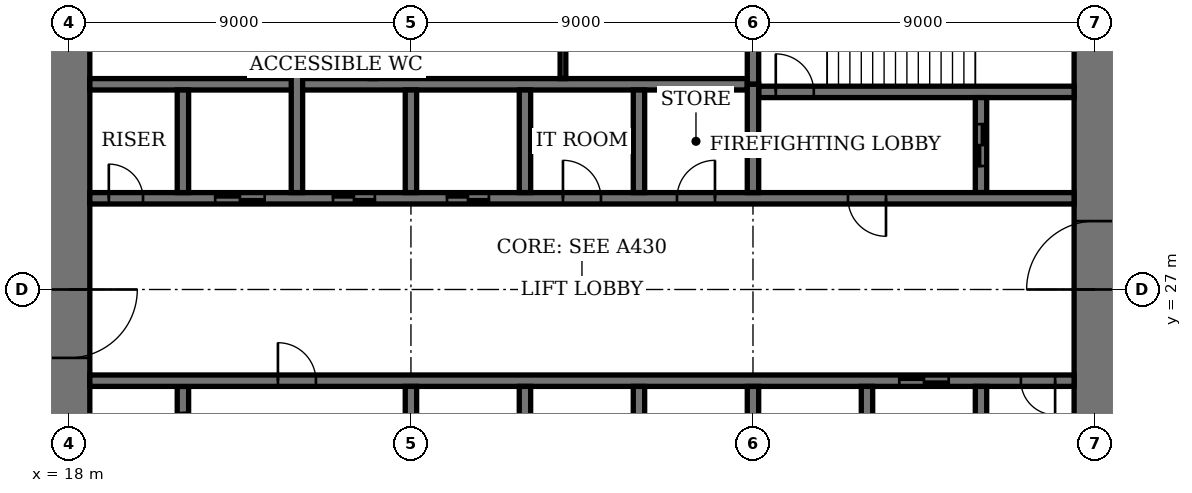
"""IFC4 building model, lengths in metres.
Left out: names, types, materials, properties, quantities, classifications, styles, units other than length and angle.
Written with IfcOpenShell. Run it as: python <this file> out.ifc"""

import sys

from ifc_helpers import new_model, si_unit, direction, frame, frame_2d, origin, place, context, subcontext, project, spatial, rectangle, extrude, element, fill, save


model = new_model("IFC4")
c1 = context("Model", 3, precision=1e-05, world=origin(), true_north=direction((0.0, 1.0)))
c2 = subcontext(c1, "Body", "Model", "MODEL_VIEW")
j1 = project(units=[si_unit("LENGTHUNIT", "METRE"), si_unit("PLANEANGLEUNIT", "RADIAN")], contexts=[c1])
p1 = place(None, origin())
s1 = spatial("IfcSite", under=j1, at=p1, CompositionType="ELEMENT")
p2 = place(p1, origin())
s2 = spatial("IfcBuilding", under=s1, at=p2, CompositionType="ELEMENT")
p3 = place(p2, frame((0.0, 0.0, 226.2)))
s3 = spatial("IfcBuildingStorey", under=s2, at=p3, CompositionType="ELEMENT", Elevation=226.2)
p4 = place(p3, frame((18.0, 35.45, 0.0), z_axis=(0.0, 0.0, 1.0), x_axis=(0.0, -1.0, 0.0)))
e1 = element("IfcWall", 1, at=p4, inside=s3, PredefinedType="SHEAR", context=c2, shape_type="SweptSolid", body=[
    extrude(rectangle(XDim=16.9, YDim=1.1, at=frame_2d((8.45, 0.0))), origin(), (0.0, 0.0, 1.0), 4.0),
])
p5 = place(p4, frame((8.45, 0.0, 0.0)))
e2 = element("IfcOpeningElement", 2, at=p5, cuts=e1, PredefinedType="OPENING", context=c2, shape_type="SweptSolid", body=[
    extrude(rectangle(XDim=1.8, YDim=2.4, at=frame_2d((0.9, 1.2))), frame((0.0, 0.56, 0.0), z_axis=(0.0, -1.0, 0.0), x_axis=(1.0, 0.0, 0.0)), (0.0, 0.0, 1.0), 1.12),
])
p6 = place(p3, frame((45.0, 18.55, 0.0), z_axis=(0.0, 0.0, 1.0), x_axis=(0.0, 1.0, 0.0)))
e3 = element("IfcWall", 3, at=p6, inside=s3, PredefinedType="SHEAR", context=c2, shape_type="SweptSolid", body=[
    extrude(rectangle(XDim=16.9, YDim=1.1, at=frame_2d((8.45, 0.0))), origin(), (0.0, 0.0, 1.0), 4.0),
])
p7 = place(p6, frame((8.45, 0.0, 0.0)))
e4 = element("IfcOpeningElement", 4, at=p7, cuts=e3, PredefinedType="OPENING", context=c2, shape_type="SweptSolid", body=[
    extrude(rectangle(XDim=1.8, YDim=2.4, at=frame_2d((0.9, 1.2))), frame((0.0, 0.56, 0.0), z_axis=(0.0, -1.0, 0.0), x_axis=(1.0, 0.0, 0.0)), (0.0, 0.0, 1.0), 1.12),
])
p8 = place(p3, frame((36.15, 32.2, 0.0), z_axis=(0.0, 0.0, 1.0), x_axis=(1.0, 0.0, 0.0)))
e5 = element("IfcWall", 5, at=p8, inside=s3, PredefinedType="SHEAR", context=c2, shape_type="SweptSolid", body=[
    extrude(rectangle(XDim=8.3, YDim=0.3, at=frame_2d((4.15, 0.0))), origin(), (0.0, 0.0, 1.0), 4.0),
])
p9 = place(p8, frame((0.45, 0.0, 0.0)))
e6 = element("IfcOpeningElement", 6, at=p9, cuts=e5, PredefinedType="OPENING", context=c2, shape_type="SweptSolid", body=[
    extrude(rectangle(XDim=1.0, YDim=2.4, at=frame_2d((0.5, 1.2))), frame((0.0, 0.16, 0.0), z_axis=(0.0, -1.0, 0.0), x_axis=(1.0, 0.0, 0.0)), (0.0, 0.0, 1.0), 0.32),
])
p10 = place(p3, frame((36.0, 32.4, 0.0), z_axis=(0.0, 0.0, 1.0), x_axis=(0.0, 1.0, 0.0)))
e7 = element("IfcWall", 7, at=p10, inside=s3, PredefinedType="SHEAR", context=c2, shape_type="SweptSolid", body=[
    extrude(rectangle(XDim=3.05, YDim=0.3, at=frame_2d((1.525, 0.0))), origin(), (0.0, 0.0, 1.0), 4.0),
])
p11 = place(p3, frame((21.0, 21.95, 0.0), z_axis=(0.0, 0.0, 1.0), x_axis=(0.0, 1.0, 0.0)))
e8 = element("IfcWall", 8, at=p11, inside=s3, PredefinedType="SHEAR", context=c2, shape_type="SweptSolid", body=[
    extrude(rectangle(XDim=2.5, YDim=0.3, at=frame_2d((1.25, 0.0))), origin(), (0.0, 0.0, 1.0), 4.0),
])
p12 = place(p11, frame((0.7, 0.0, 0.0)))
e9 = element("IfcOpeningElement", 9, at=p12, cuts=e8, PredefinedType="OPENING", context=c2, shape_type="SweptSolid", body=[
    extrude(rectangle(XDim=1.1, YDim=2.4, at=frame_2d((0.55, 1.2))), frame((0.0, 0.16, 0.0), z_axis=(0.0, -1.0, 0.0), x_axis=(1.0, 0.0, 0.0)), (0.0, 0.0, 1.0), 0.32),
])
p13 = place(p3, frame((42.0, 29.55, 0.0), z_axis=(0.0, 0.0, 1.0), x_axis=(0.0, 1.0, 0.0)))
e10 = element("IfcWall", 10, at=p13, inside=s3, PredefinedType="SHEAR", context=c2, shape_type="SweptSolid", body=[
    extrude(rectangle(XDim=2.5, YDim=0.3, at=frame_2d((1.25, 0.0))), origin(), (0.0, 0.0, 1.0), 4.0),
])
p14 = place(p13, frame((0.7, 0.0, 0.0)))
e11 = element("IfcOpeningElement", 11, at=p14, cuts=e10, PredefinedType="OPENING", context=c2, shape_type="SweptSolid", body=[
    extrude(rectangle(XDim=1.1, YDim=2.4, at=frame_2d((0.55, 1.2))), frame((0.0, 0.16, 0.0), z_axis=(0.0, -1.0, 0.0), x_axis=(1.0, 0.0, 0.0)), (0.0, 0.0, 1.0), 0.32),
])
p15 = place(p3, frame((18.55, 24.6, 0.0), z_axis=(0.0, 0.0, 1.0), x_axis=(1.0, 0.0, 0.0)))
e12 = element("IfcWall", 12, at=p15, inside=s3, PredefinedType="SHEAR", context=c2, shape_type="SweptSolid", body=[
    extrude(rectangle(XDim=25.9, YDim=0.3, at=frame_2d((12.95, 0.0))), origin(), (0.0, 0.0, 1.0), 4.0),
])
p16 = place(p15, frame((4.95, 0.0, 0.0)))
e13 = element("IfcOpeningElement", 13, at=p16, cuts=e12, PredefinedType="OPENING", context=c2, shape_type="SweptSolid", body=[
    extrude(rectangle(XDim=1.0, YDim=2.4, at=frame_2d((0.5, 1.2))), frame((0.0, 0.16, 0.0), z_axis=(0.0, -1.0, 0.0), x_axis=(1.0, 0.0, 0.0)), (0.0, 0.0, 1.0), 0.32),
])
p17 = place(p15, frame((24.5, 0.0, 0.0)))
e14 = element("IfcOpeningElement", 14, at=p17, cuts=e12, PredefinedType="OPENING", context=c2, shape_type="SweptSolid", body=[
    extrude(rectangle(XDim=0.9, YDim=2.1, at=frame_2d((0.45, 1.05))), frame((0.0, 0.16, 0.0), z_axis=(0.0, -1.0, 0.0), x_axis=(1.0, 0.0, 0.0)), (0.0, 0.0, 1.0), 0.32),
])
p18 = place(p15, frame((21.3, 0.0, 0.0)))
e15 = element("IfcOpeningElement", 15, at=p18, cuts=e12, PredefinedType="OPENING", context=c2, shape_type="SweptSolid", body=[
    extrude(rectangle(XDim=1.3, YDim=2.4, at=frame_2d((0.65, 1.2))), frame((0.0, 0.16, 0.0), z_axis=(0.0, -1.0, 0.0), x_axis=(1.0, 0.0, 0.0)), (0.0, 0.0, 1.0), 0.32),
])
p19 = place(p3, frame((18.55, 29.4, 0.0), z_axis=(0.0, 0.0, 1.0), x_axis=(1.0, 0.0, 0.0)))
e16 = element("IfcWall", 16, at=p19, inside=s3, PredefinedType="SHEAR", context=c2, shape_type="SweptSolid", body=[
    extrude(rectangle(XDim=25.9, YDim=0.3, at=frame_2d((12.95, 0.0))), origin(), (0.0, 0.0, 1.0), 4.0),
])
p20 = place(p19, frame((19.95, 0.0, 0.0)))
e17 = element("IfcOpeningElement", 17, at=p20, cuts=e16, PredefinedType="OPENING", context=c2, shape_type="SweptSolid", body=[
    extrude(rectangle(XDim=1.0, YDim=2.4, at=frame_2d((0.5, 1.2))), frame((0.0, 0.16, 0.0), z_axis=(0.0, -1.0, 0.0), x_axis=(1.0, 0.0, 0.0)), (0.0, 0.0, 1.0), 0.32),
])
p21 = place(p19, frame((0.5, 0.0, 0.0)))
e18 = element("IfcOpeningElement", 18, at=p21, cuts=e16, PredefinedType="OPENING", context=c2, shape_type="SweptSolid", body=[
    extrude(rectangle(XDim=0.9, YDim=2.1, at=frame_2d((0.45, 1.05))), frame((0.0, 0.16, 0.0), z_axis=(0.0, -1.0, 0.0), x_axis=(1.0, 0.0, 0.0)), (0.0, 0.0, 1.0), 0.32),
])
p22 = place(p19, frame((15.45, 0.0, 0.0)))
e19 = element("IfcOpeningElement", 19, at=p22, cuts=e16, PredefinedType="OPENING", context=c2, shape_type="SweptSolid", body=[
    extrude(rectangle(XDim=1.0, YDim=2.4, at=frame_2d((0.5, 1.2))), frame((0.0, 0.16, 0.0), z_axis=(0.0, -1.0, 0.0), x_axis=(1.0, 0.0, 0.0)), (0.0, 0.0, 1.0), 0.32),
])
p23 = place(p19, frame((12.45, 0.0, 0.0)))
e20 = element("IfcOpeningElement", 20, at=p23, cuts=e16, PredefinedType="OPENING", context=c2, shape_type="SweptSolid", body=[
    extrude(rectangle(XDim=1.0, YDim=2.4, at=frame_2d((0.5, 1.2))), frame((0.0, 0.16, 0.0), z_axis=(0.0, -1.0, 0.0), x_axis=(1.0, 0.0, 0.0)), (0.0, 0.0, 1.0), 0.32),
])
p24 = place(p19, frame((9.4, 0.0, 0.0)))
e21 = element("IfcOpeningElement", 21, at=p24, cuts=e16, PredefinedType="OPENING", context=c2, shape_type="SweptSolid", body=[
    extrude(rectangle(XDim=1.1, YDim=2.4, at=frame_2d((0.55, 1.2))), frame((0.0, 0.16, 0.0), z_axis=(0.0, -1.0, 0.0), x_axis=(1.0, 0.0, 0.0)), (0.0, 0.0, 1.0), 0.32),
])
p25 = place(p19, frame((6.4, 0.0, 0.0)))
e22 = element("IfcOpeningElement", 22, at=p25, cuts=e16, PredefinedType="OPENING", context=c2, shape_type="SweptSolid", body=[
    extrude(rectangle(XDim=1.1, YDim=2.4, at=frame_2d((0.55, 1.2))), frame((0.0, 0.16, 0.0), z_axis=(0.0, -1.0, 0.0), x_axis=(1.0, 0.0, 0.0)), (0.0, 0.0, 1.0), 0.32),
])
p26 = place(p19, frame((3.3, 0.0, 0.0)))
e23 = element("IfcOpeningElement", 23, at=p26, cuts=e16, PredefinedType="OPENING", context=c2, shape_type="SweptSolid", body=[
    extrude(rectangle(XDim=1.3, YDim=2.4, at=frame_2d((0.65, 1.2))), frame((0.0, 0.16, 0.0), z_axis=(0.0, -1.0, 0.0), x_axis=(1.0, 0.0, 0.0)), (0.0, 0.0, 1.0), 0.32),
])
p27 = place(p3, frame((18.55, 32.4, 0.0), z_axis=(0.0, 0.0, 1.0), x_axis=(1.0, 0.0, 0.0)))
e24 = element("IfcWall", 24, at=p27, inside=s3, PredefinedType="SHEAR", context=c2, shape_type="SweptSolid", body=[
    extrude(rectangle(XDim=17.3, YDim=0.3, at=frame_2d((8.65, 0.0))), origin(), (0.0, 0.0, 1.0), 4.0),
])
for number, where, z_axis, x_axis in (
    (25, (30.0, 21.75, 0.0), (0.0, 0.0, 1.0), (0.0, 1.0, 0.0)),
    (26, (33.0, 29.55, 0.0), (0.0, 0.0, 1.0), (0.0, 1.0, 0.0)),
    (27, (33.0, 21.75, 0.0), (0.0, 0.0, 1.0), (0.0, 1.0, 0.0)),
    (28, (30.0, 29.55, 0.0), (0.0, 0.0, 1.0), (0.0, 1.0, 0.0)),
    (29, (36.0, 21.75, 0.0), (0.0, 0.0, 1.0), (0.0, 1.0, 0.0)),
    (30, (27.0, 29.55, 0.0), (0.0, 0.0, 1.0), (0.0, 1.0, 0.0)),
):
    element("IfcWall", number, at=place(p3, frame(where, z_axis=z_axis, x_axis=x_axis)), inside=s3, PredefinedType="SHEAR", context=c2, shape_type="SweptSolid", body=[
        extrude(rectangle(XDim=2.7, YDim=0.3, at=frame_2d((1.35, 0.0))), origin(), (0.0, 0.0, 1.0), 4.0),
    ])
for number, where, z_axis, x_axis in (
    (31, (39.0, 18.55, 0.0), (0.0, 0.0, 1.0), (0.0, 1.0, 0.0)),
    (32, (24.0, 29.55, 0.0), (0.0, 0.0, 1.0), (0.0, 1.0, 0.0)),
):
    element("IfcWall", number, at=place(p3, frame(where, z_axis=z_axis, x_axis=x_axis)), inside=s3, PredefinedType="SHEAR", context=c2, shape_type="SweptSolid", body=[
        extrude(rectangle(XDim=5.9, YDim=0.3, at=frame_2d((2.95, 0.0))), origin(), (0.0, 0.0, 1.0), 4.0),
    ])
for number, where, z_axis, x_axis in (
    (33, (42.0, 21.75, 0.0), (0.0, 0.0, 1.0), (0.0, 1.0, 0.0)),
    (34, (21.0, 29.55, 0.0), (0.0, 0.0, 1.0), (0.0, 1.0, 0.0)),
):
    element("IfcWall", number, at=place(p3, frame(where, z_axis=z_axis, x_axis=x_axis)), inside=s3, PredefinedType="SHEAR", context=c2, shape_type="SweptSolid", body=[
        extrude(rectangle(XDim=2.7, YDim=0.3, at=frame_2d((1.35, 0.0))), origin(), (0.0, 0.0, 1.0), 4.0),
    ])
for number, where, z_axis, x_axis in (
    (35, (27.0, 21.6, 0.0), (0.0, 0.0, 1.0), (0.0, 1.0, 0.0)),
    (36, (36.0, 29.55, 0.0), (0.0, 0.0, 1.0), (0.0, 1.0, 0.0)),
):
    element("IfcWall", number, at=place(p3, frame(where, z_axis=z_axis, x_axis=x_axis)), inside=s3, PredefinedType="SHEAR", context=c2, shape_type="SweptSolid", body=[
        extrude(rectangle(XDim=2.85, YDim=0.3, at=frame_2d((1.425, 0.0))), origin(), (0.0, 0.0, 1.0), 4.0),
    ])
for number, where, z_axis, x_axis in (
    (37, (31.0, 32.55, 0.0), (0.0, 0.0, 1.0), (0.0, 1.0, 0.0)),
    (38, (26.0, 32.55, 0.0), (0.0, 0.0, 1.0), (0.0, 1.0, 0.0)),
):
    element("IfcWall", number, at=place(p3, frame(where, z_axis=z_axis, x_axis=x_axis)), inside=s3, PredefinedType="PARTITIONING", context=c2, shape_type="SweptSolid", body=[
        extrude(rectangle(XDim=2.9, YDim=0.15, at=frame_2d((1.45, 0.0))), origin(), (0.0, 0.0, 1.0), 3.75),
    ])
p28 = place(p5, origin())
e39 = element("IfcDoor", 39, at=p28, inside=s3, OperationType="DOUBLE_DOOR_DOUBLE_SWING", PredefinedType="DOOR", context=c2, shape_type="SweptSolid", body=[
    extrude(rectangle(XDim=1.8, YDim=2.4, at=frame_2d((0.9, 1.2))), frame((0.0, 0.03, 0.0), z_axis=(0.0, -1.0, 0.0), x_axis=(1.0, 0.0, 0.0)), (0.0, 0.0, 1.0), 0.06),
    extrude(rectangle(XDim=0.04, YDim=2.4, at=frame_2d((0.02, 1.2))), frame((0.0, 0.55, 0.0), z_axis=(0.0, -1.0, 0.0), x_axis=(1.0, 0.0, 0.0)), (0.0, 0.0, 1.0), 1.1),
    extrude(rectangle(XDim=0.04, YDim=2.4, at=frame_2d((1.78, 1.2))), frame((0.0, 0.55, 0.0), z_axis=(0.0, -1.0, 0.0), x_axis=(1.0, 0.0, 0.0)), (0.0, 0.0, 1.0), 1.1),
    extrude(rectangle(XDim=1.8, YDim=0.04, at=frame_2d((0.9, 2.38))), frame((0.0, 0.55, 0.0), z_axis=(0.0, -1.0, 0.0), x_axis=(1.0, 0.0, 0.0)), (0.0, 0.0, 1.0), 1.1),
])
fill(e2, e39)
p29 = place(p7, origin())
e40 = element("IfcDoor", 40, at=p29, inside=s3, OperationType="DOUBLE_DOOR_DOUBLE_SWING", PredefinedType="DOOR", context=c2, shape_type="SweptSolid", body=[
    extrude(rectangle(XDim=1.8, YDim=2.4, at=frame_2d((0.9, 1.2))), frame((0.0, 0.03, 0.0), z_axis=(0.0, -1.0, 0.0), x_axis=(1.0, 0.0, 0.0)), (0.0, 0.0, 1.0), 0.06),
    extrude(rectangle(XDim=0.04, YDim=2.4, at=frame_2d((0.02, 1.2))), frame((0.0, 0.55, 0.0), z_axis=(0.0, -1.0, 0.0), x_axis=(1.0, 0.0, 0.0)), (0.0, 0.0, 1.0), 1.1),
    extrude(rectangle(XDim=0.04, YDim=2.4, at=frame_2d((1.78, 1.2))), frame((0.0, 0.55, 0.0), z_axis=(0.0, -1.0, 0.0), x_axis=(1.0, 0.0, 0.0)), (0.0, 0.0, 1.0), 1.1),
    extrude(rectangle(XDim=1.8, YDim=0.04, at=frame_2d((0.9, 2.38))), frame((0.0, 0.55, 0.0), z_axis=(0.0, -1.0, 0.0), x_axis=(1.0, 0.0, 0.0)), (0.0, 0.0, 1.0), 1.1),
])
fill(e4, e40)
p30 = place(p9, origin())
e41 = element("IfcDoor", 41, at=p30, inside=s3, OperationType="SINGLE_SWING_RIGHT", PredefinedType="DOOR", context=c2, shape_type="SweptSolid", body=[
    extrude(rectangle(XDim=1.0, YDim=2.4, at=frame_2d((0.5, 1.2))), frame((0.0, 0.03, 0.0), z_axis=(0.0, -1.0, 0.0), x_axis=(1.0, 0.0, 0.0)), (0.0, 0.0, 1.0), 0.06),
])
fill(e6, e41)
p31 = place(p16, origin())
e42 = element("IfcDoor", 42, at=p31, inside=s3, OperationType="SINGLE_SWING_RIGHT", PredefinedType="DOOR", context=c2, shape_type="SweptSolid", body=[
    extrude(rectangle(XDim=1.0, YDim=2.4, at=frame_2d((0.5, 1.2))), frame((0.0, 0.03, 0.0), z_axis=(0.0, -1.0, 0.0), x_axis=(1.0, 0.0, 0.0)), (0.0, 0.0, 1.0), 0.06),
])
fill(e13, e42)
p32 = place(p20, origin())
e43 = element("IfcDoor", 43, at=p32, inside=s3, OperationType="SINGLE_SWING_RIGHT", PredefinedType="DOOR", context=c2, shape_type="SweptSolid", body=[
    extrude(rectangle(XDim=1.0, YDim=2.4, at=frame_2d((0.5, 1.2))), frame((0.0, 0.03, 0.0), z_axis=(0.0, -1.0, 0.0), x_axis=(1.0, 0.0, 0.0)), (0.0, 0.0, 1.0), 0.06),
])
fill(e17, e43)
p33 = place(p17, origin())
e44 = element("IfcDoor", 44, at=p33, inside=s3, OperationType="SINGLE_SWING_RIGHT", PredefinedType="DOOR", context=c2, shape_type="SweptSolid", body=[
    extrude(rectangle(XDim=0.9, YDim=2.1, at=frame_2d((0.45, 1.05))), frame((0.0, 0.03, 0.0), z_axis=(0.0, -1.0, 0.0), x_axis=(1.0, 0.0, 0.0)), (0.0, 0.0, 1.0), 0.06),
])
fill(e14, e44)
p34 = place(p21, origin())
e45 = element("IfcDoor", 45, at=p34, inside=s3, OperationType="SINGLE_SWING_RIGHT", PredefinedType="DOOR", context=c2, shape_type="SweptSolid", body=[
    extrude(rectangle(XDim=0.9, YDim=2.1, at=frame_2d((0.45, 1.05))), frame((0.0, 0.03, 0.0), z_axis=(0.0, -1.0, 0.0), x_axis=(1.0, 0.0, 0.0)), (0.0, 0.0, 1.0), 0.06),
])
fill(e18, e45)
p35 = place(p22, origin())
e46 = element("IfcDoor", 46, at=p35, inside=s3, OperationType="SINGLE_SWING_LEFT", PredefinedType="DOOR", context=c2, shape_type="SweptSolid", body=[
    extrude(rectangle(XDim=1.0, YDim=2.4, at=frame_2d((0.5, 1.2))), frame((0.0, 0.03, 0.0), z_axis=(0.0, -1.0, 0.0), x_axis=(1.0, 0.0, 0.0)), (0.0, 0.0, 1.0), 0.06),
])
fill(e19, e46)
p36 = place(p23, origin())
e47 = element("IfcDoor", 47, at=p36, inside=s3, OperationType="SINGLE_SWING_RIGHT", PredefinedType="DOOR", context=c2, shape_type="SweptSolid", body=[
    extrude(rectangle(XDim=1.0, YDim=2.4, at=frame_2d((0.5, 1.2))), frame((0.0, 0.03, 0.0), z_axis=(0.0, -1.0, 0.0), x_axis=(1.0, 0.0, 0.0)), (0.0, 0.0, 1.0), 0.06),
])
fill(e20, e47)
p37 = place(p24, origin())
e48 = element("IfcDoor", 48, at=p37, inside=s3, OperationType="DOUBLE_DOOR_SLIDING", PredefinedType="DOOR", context=c2, shape_type="SweptSolid", body=[
    extrude(rectangle(XDim=1.1, YDim=2.4, at=frame_2d((0.55, 1.2))), frame((0.0, 0.02, 0.0), z_axis=(0.0, -1.0, 0.0), x_axis=(1.0, 0.0, 0.0)), (0.0, 0.0, 1.0), 0.04),
])
fill(e21, e48)
p38 = place(p25, origin())
e49 = element("IfcDoor", 49, at=p38, inside=s3, OperationType="DOUBLE_DOOR_SLIDING", PredefinedType="DOOR", context=c2, shape_type="SweptSolid", body=[
    extrude(rectangle(XDim=1.1, YDim=2.4, at=frame_2d((0.55, 1.2))), frame((0.0, 0.02, 0.0), z_axis=(0.0, -1.0, 0.0), x_axis=(1.0, 0.0, 0.0)), (0.0, 0.0, 1.0), 0.04),
])
fill(e22, e49)
p39 = place(p18, origin())
e50 = element("IfcDoor", 50, at=p39, inside=s3, OperationType="DOUBLE_DOOR_SLIDING", PredefinedType="DOOR", context=c2, shape_type="SweptSolid", body=[
    extrude(rectangle(XDim=1.3, YDim=2.4, at=frame_2d((0.65, 1.2))), frame((0.0, 0.02, 0.0), z_axis=(0.0, -1.0, 0.0), x_axis=(1.0, 0.0, 0.0)), (0.0, 0.0, 1.0), 0.04),
])
fill(e15, e50)
p40 = place(p26, origin())
e51 = element("IfcDoor", 51, at=p40, inside=s3, OperationType="DOUBLE_DOOR_SLIDING", PredefinedType="DOOR", context=c2, shape_type="SweptSolid", body=[
    extrude(rectangle(XDim=1.3, YDim=2.4, at=frame_2d((0.65, 1.2))), frame((0.0, 0.02, 0.0), z_axis=(0.0, -1.0, 0.0), x_axis=(1.0, 0.0, 0.0)), (0.0, 0.0, 1.0), 0.04),
])
fill(e23, e51)
p41 = place(p14, origin())
e52 = element("IfcDoor", 52, at=p41, inside=s3, OperationType="DOUBLE_DOOR_SLIDING", PredefinedType="DOOR", context=c2, shape_type="SweptSolid", body=[
    extrude(rectangle(XDim=1.1, YDim=2.4, at=frame_2d((0.55, 1.2))), frame((0.0, 0.03, 0.0), z_axis=(0.0, -1.0, 0.0), x_axis=(1.0, 0.0, 0.0)), (0.0, 0.0, 1.0), 0.06),
])
fill(e11, e52)
save(model, sys.argv[1])
